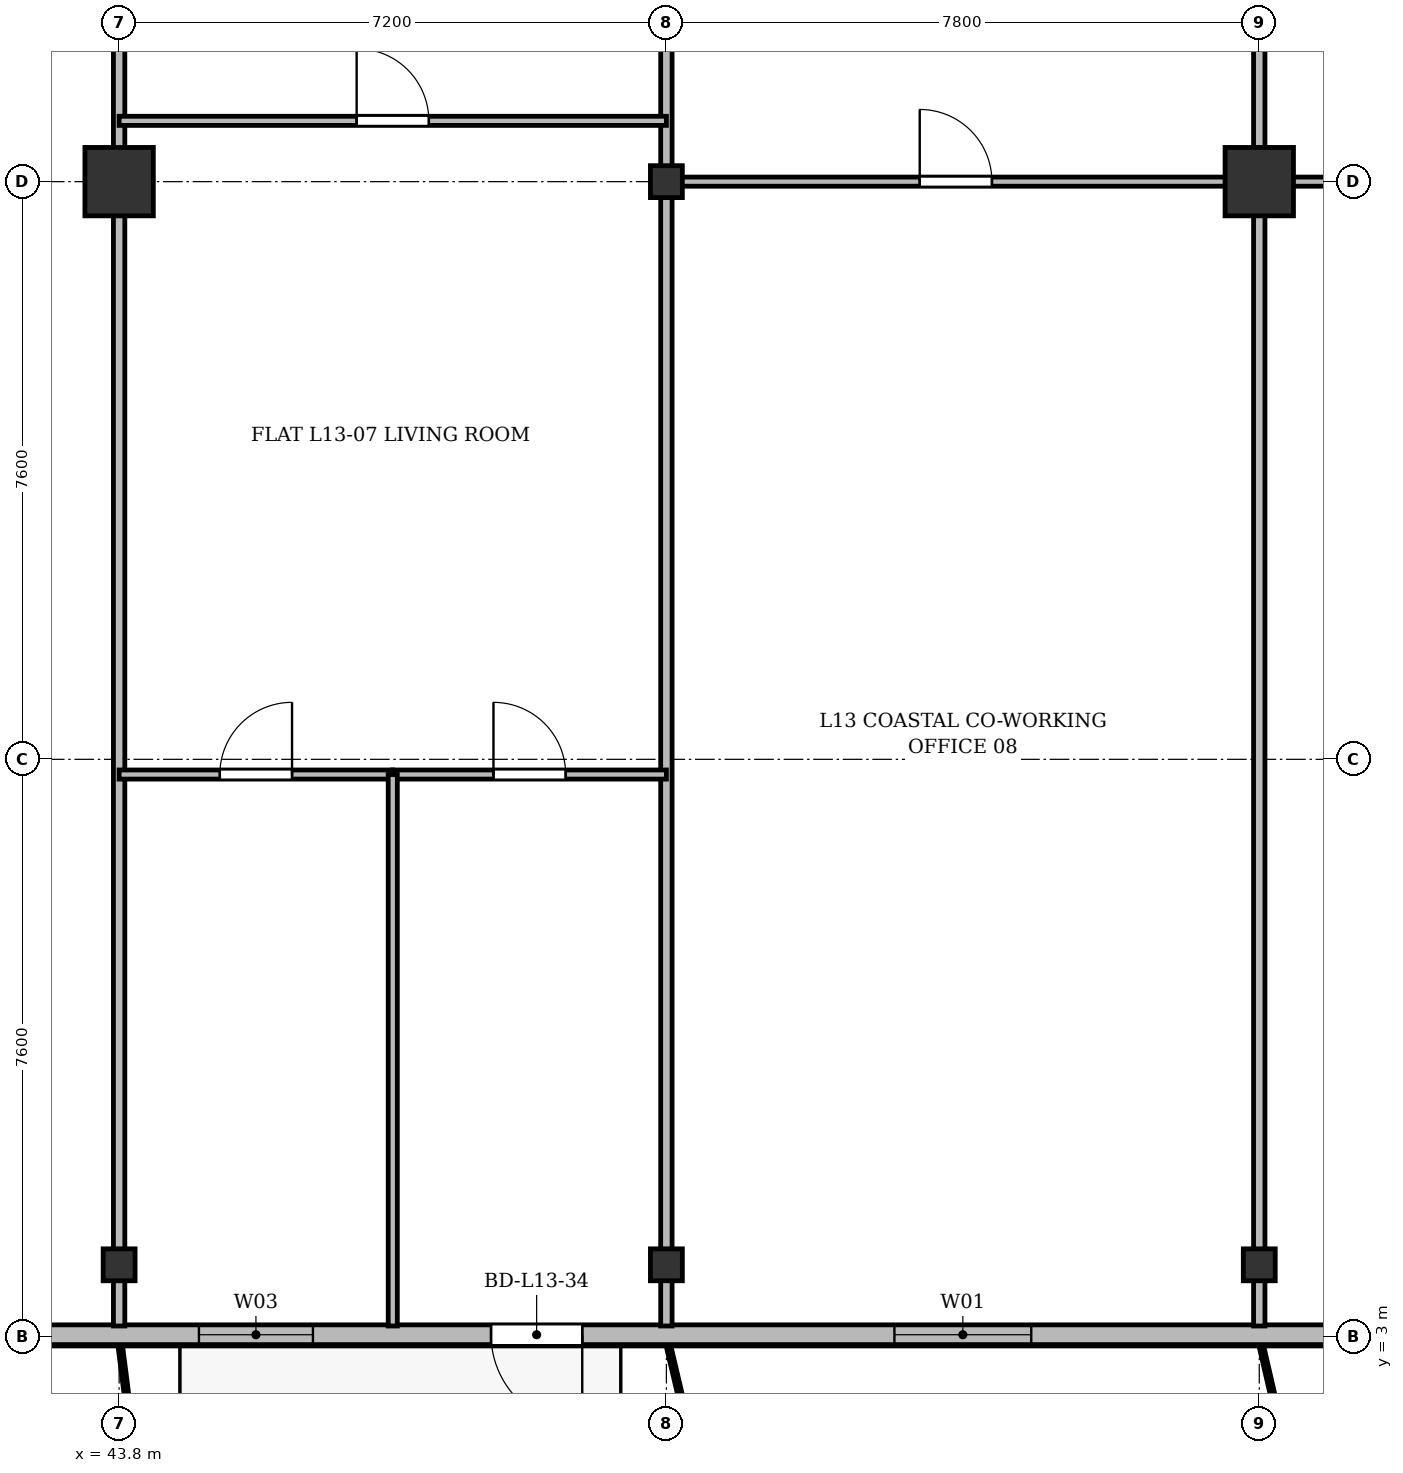
"""IFC4 building model, lengths in metres.
Left out: names, types, materials, properties, quantities, classifications, styles, units other than length and angle.
Written with IfcOpenShell. Run it as: python <this file> out.ifc"""

import sys

from ifc_helpers import new_model, si_unit, direction, frame, frame_2d, origin, origin_2d, place, context, subcontext, project, spatial, rectangle, i_section, extrude, source, transform, mapped, element, fill, save


model = new_model("IFC4")
c1 = context("Model", 3, precision=1e-05, world=origin(), true_north=direction((0.0, 1.0)))
c2 = subcontext(c1, "Body", "Model", "MODEL_VIEW")
j1 = project(units=[si_unit("LENGTHUNIT", "METRE"), si_unit("PLANEANGLEUNIT", "RADIAN")], contexts=[c1])
p1 = place(None, origin())
s1 = spatial("IfcSite", under=j1, at=p1, CompositionType="ELEMENT")
p2 = place(p1, origin())
s2 = spatial("IfcBuilding", under=s1, at=p2, CompositionType="ELEMENT")
p3 = place(p2, frame((0.0, 0.0, 52.3)))
s3 = spatial("IfcBuildingStorey", under=s2, at=p3, CompositionType="ELEMENT", Elevation=52.3)
m1 = source(origin(), c2, "Body", "SweptSolid", [
    extrude(i_section(OverallWidth=0.42, OverallDepth=0.42, WebThickness=0.026, FlangeThickness=0.04, at=origin_2d()), origin(), (0.0, 0.0, 1.0), 3.6),
])
p4 = place(p3, frame((43.8, 3.95, 0.0), z_axis=(0.0, 0.0, 1.0), x_axis=(1.0, 0.0, 0.0)))
e1 = element("IfcColumn", 1, at=p4, inside=s3, PredefinedType="COLUMN", context=c2, shape_type="MappedRepresentation", body=[
    mapped(m1, transform((0.0, 0.0, 0.0), x_axis=(1.0, 0.0, 0.0), y_axis=(0.0, 1.0, 0.0), z_axis=(0.0, 0.0, 1.0), scale=1.0)),
])
m2 = source(origin(), c2, "Body", "SweptSolid", [
    extrude(rectangle(XDim=0.9, YDim=0.9, at=origin_2d()), origin(), (0.0, 0.0, 1.0), 3.6),
])
p5 = place(p3, frame((43.8, 18.2, 0.0), z_axis=(0.0, 0.0, 1.0), x_axis=(1.0, 0.0, 0.0)))
e2 = element("IfcColumn", 2, at=p5, inside=s3, PredefinedType="COLUMN", context=c2, shape_type="MappedRepresentation", body=[
    mapped(m2, transform((0.0, 0.0, 0.0), x_axis=(1.0, 0.0, 0.0), y_axis=(0.0, 1.0, 0.0), z_axis=(0.0, 0.0, 1.0), scale=1.0)),
])
for number, where, z_axis, x_axis in (
    (3, (51.0, 3.95, 0.0), (0.0, 0.0, 1.0), (1.0, 0.0, 0.0)),
    (4, (51.0, 18.2, 0.0), (0.0, 0.0, 1.0), (1.0, 0.0, 0.0)),
    (5, (58.8, 3.95, 0.0), (0.0, 0.0, 1.0), (1.0, 0.0, 0.0)),
):
    element("IfcColumn", number, at=place(p3, frame(where, z_axis=z_axis, x_axis=x_axis)), inside=s3, PredefinedType="COLUMN", context=c2, shape_type="MappedRepresentation", body=[
        mapped(m1, transform((0.0, 0.0, 0.0), x_axis=(1.0, 0.0, 0.0), y_axis=(0.0, 1.0, 0.0), z_axis=(0.0, 0.0, 1.0), scale=1.0)),
    ])
p6 = place(p3, frame((58.8, 18.2, 0.0), z_axis=(0.0, 0.0, 1.0), x_axis=(1.0, 0.0, 0.0)))
e6 = element("IfcColumn", 6, at=p6, inside=s3, PredefinedType="COLUMN", context=c2, shape_type="MappedRepresentation", body=[
    mapped(m2, transform((0.0, 0.0, 0.0), x_axis=(1.0, 0.0, 0.0), y_axis=(0.0, 1.0, 0.0), z_axis=(0.0, 0.0, 1.0), scale=1.0)),
])
p7 = place(p3, frame((66.9, 3.03, 0.0), z_axis=(0.0, 0.0, 1.0), x_axis=(-1.0, 0.0, 0.0)))
e7 = element("IfcWall", 7, at=p7, inside=s3, PredefinedType="SOLIDWALL", context=c2, shape_type="SweptSolid", body=[
    extrude(rectangle(XDim=59.4, YDim=0.26, at=frame_2d((29.7, 0.0))), origin(), (0.0, 0.0, 1.0), 3.34),
])
p8 = place(p7, frame((0.495, 0.0, 0.9)))
e8 = element("IfcOpeningElement", 8, at=p8, cuts=e7, PredefinedType="OPENING", context=c2, shape_type="SweptSolid", body=[
    extrude(rectangle(XDim=2.0, YDim=1.95, at=frame_2d((1.0, 0.975))), frame((0.0, 0.14, 0.0), z_axis=(0.0, -1.0, 0.0), x_axis=(1.0, 0.0, 0.0)), (0.0, 0.0, 1.0), 0.28),
])
p9 = place(p7, frame((4.675, 0.0, 0.9)))
e9 = element("IfcOpeningElement", 9, at=p9, cuts=e7, PredefinedType="OPENING", context=c2, shape_type="SweptSolid", body=[
    extrude(rectangle(XDim=1.65, YDim=1.85, at=frame_2d((0.825, 0.925))), frame((0.0, 0.14, 0.0), z_axis=(0.0, -1.0, 0.0), x_axis=(1.0, 0.0, 0.0)), (0.0, 0.0, 1.0), 0.28),
])
p10 = place(p7, frame((11.1, 0.0, 0.9)))
e10 = element("IfcOpeningElement", 10, at=p10, cuts=e7, PredefinedType="OPENING", context=c2, shape_type="SweptSolid", body=[
    extrude(rectangle(XDim=1.8, YDim=1.8, at=frame_2d((0.9, 0.9))), frame((0.0, 0.14, 0.0), z_axis=(0.0, -1.0, 0.0), x_axis=(1.0, 0.0, 0.0)), (0.0, 0.0, 1.0), 0.28),
])
p11 = place(p7, frame((17.007, 0.0, 0.0)))
e11 = element("IfcOpeningElement", 11, at=p11, cuts=e7, PredefinedType="OPENING", context=c2, shape_type="SweptSolid", body=[
    extrude(rectangle(XDim=1.2, YDim=2.2, at=frame_2d((0.6, 1.1))), frame((0.0, 0.14, 0.0), z_axis=(0.0, -1.0, 0.0), x_axis=(1.0, 0.0, 0.0)), (0.0, 0.0, 1.0), 0.28),
])
p12 = place(p7, frame((20.55, 0.0, 0.9)))
e12 = element("IfcOpeningElement", 12, at=p12, cuts=e7, PredefinedType="OPENING", context=c2, shape_type="SweptSolid", body=[
    extrude(rectangle(XDim=1.5, YDim=1.75, at=frame_2d((0.75, 0.875))), frame((0.0, 0.14, 0.0), z_axis=(0.0, -1.0, 0.0), x_axis=(1.0, 0.0, 0.0)), (0.0, 0.0, 1.0), 0.28),
])
p13 = place(p7, frame((24.5, 0.0, 0.9)))
e13 = element("IfcOpeningElement", 13, at=p13, cuts=e7, PredefinedType="OPENING", context=c2, shape_type="SweptSolid", body=[
    extrude(rectangle(XDim=2.0, YDim=1.95, at=frame_2d((1.0, 0.975))), frame((0.0, 0.14, 0.0), z_axis=(0.0, -1.0, 0.0), x_axis=(1.0, 0.0, 0.0)), (0.0, 0.0, 1.0), 0.28),
])
p14 = place(p7, frame((31.275, 0.0, 0.9)))
e14 = element("IfcOpeningElement", 14, at=p14, cuts=e7, PredefinedType="OPENING", context=c2, shape_type="SweptSolid", body=[
    extrude(rectangle(XDim=1.65, YDim=1.85, at=frame_2d((0.825, 0.925))), frame((0.0, 0.14, 0.0), z_axis=(0.0, -1.0, 0.0), x_axis=(1.0, 0.0, 0.0)), (0.0, 0.0, 1.0), 0.28),
])
p15 = place(p7, frame((39.0, 0.0, 0.9)))
e15 = element("IfcOpeningElement", 15, at=p15, cuts=e7, PredefinedType="OPENING", context=c2, shape_type="SweptSolid", body=[
    extrude(rectangle(XDim=1.8, YDim=1.8, at=frame_2d((0.9, 0.9))), frame((0.0, 0.14, 0.0), z_axis=(0.0, -1.0, 0.0), x_axis=(1.0, 0.0, 0.0)), (0.0, 0.0, 1.0), 0.28),
])
p16 = place(p7, frame((45.435, 0.0, 0.0)))
e16 = element("IfcOpeningElement", 16, at=p16, cuts=e7, PredefinedType="OPENING", context=c2, shape_type="SweptSolid", body=[
    extrude(rectangle(XDim=1.2, YDim=2.2, at=frame_2d((0.6, 1.1))), frame((0.0, 0.14, 0.0), z_axis=(0.0, -1.0, 0.0), x_axis=(1.0, 0.0, 0.0)), (0.0, 0.0, 1.0), 0.28),
])
p17 = place(p7, frame((48.6, 0.0, 0.9)))
e17 = element("IfcOpeningElement", 17, at=p17, cuts=e7, PredefinedType="OPENING", context=c2, shape_type="SweptSolid", body=[
    extrude(rectangle(XDim=1.5, YDim=1.75, at=frame_2d((0.75, 0.875))), frame((0.0, 0.14, 0.0), z_axis=(0.0, -1.0, 0.0), x_axis=(1.0, 0.0, 0.0)), (0.0, 0.0, 1.0), 0.28),
])
p18 = place(p7, frame((52.1, 0.0, 0.9)))
e18 = element("IfcOpeningElement", 18, at=p18, cuts=e7, PredefinedType="OPENING", context=c2, shape_type="SweptSolid", body=[
    extrude(rectangle(XDim=2.0, YDim=1.95, at=frame_2d((1.0, 0.975))), frame((0.0, 0.14, 0.0), z_axis=(0.0, -1.0, 0.0), x_axis=(1.0, 0.0, 0.0)), (0.0, 0.0, 1.0), 0.28),
])
p19 = place(p7, frame((56.28, 0.0, 0.9)))
e19 = element("IfcOpeningElement", 19, at=p19, cuts=e7, PredefinedType="OPENING", context=c2, shape_type="SweptSolid", body=[
    extrude(rectangle(XDim=1.65, YDim=1.85, at=frame_2d((0.825, 0.925))), frame((0.0, 0.14, 0.0), z_axis=(0.0, -1.0, 0.0), x_axis=(1.0, 0.0, 0.0)), (0.0, 0.0, 1.0), 0.28),
])
for number, where, z_axis, x_axis in (
    (20, (43.8, 3.145, 0.0), (0.0, 0.0, 1.0), (0.0, 1.0, 0.0)),
    (21, (51.0, 3.145, 0.0), (0.0, 0.0, 1.0), (0.0, 1.0, 0.0)),
    (22, (58.8, 3.145, 0.0), (0.0, 0.0, 1.0), (0.0, 1.0, 0.0)),
):
    element("IfcWall", number, at=place(p3, frame(where, z_axis=z_axis, x_axis=x_axis)), inside=s3, PredefinedType="PARTITIONING", context=c2, shape_type="SweptSolid", body=[
        extrude(rectangle(XDim=24.455, YDim=0.15, at=frame_2d((12.228, 0.0))), origin(), (0.0, 0.0, 1.0), 2.752),
    ])
p20 = place(p3, frame((43.8, 19.0, 0.0), z_axis=(0.0, 0.0, 1.0), x_axis=(1.0, 0.0, 0.0)))
e23 = element("IfcWall", 23, at=p20, inside=s3, PredefinedType="PARTITIONING", context=c2, shape_type="SweptSolid", body=[
    extrude(rectangle(XDim=7.2, YDim=0.12, at=frame_2d((3.6, 0.0))), origin(), (0.0, 0.0, 1.0), 2.752),
])
p21 = place(p20, frame((3.125, 0.0, 0.0)))
e24 = element("IfcOpeningElement", 24, at=p21, cuts=e23, PredefinedType="OPENING", context=c2, shape_type="SweptSolid", body=[
    extrude(rectangle(XDim=0.95, YDim=2.15, at=frame_2d((0.475, 1.075))), frame((0.0, 0.07, 0.0), z_axis=(0.0, -1.0, 0.0), x_axis=(1.0, 0.0, 0.0)), (0.0, 0.0, 1.0), 0.14),
])
p22 = place(p3, frame((43.8, 10.4, 0.0), z_axis=(0.0, 0.0, 1.0), x_axis=(1.0, 0.0, 0.0)))
e25 = element("IfcWall", 25, at=p22, inside=s3, PredefinedType="PARTITIONING", context=c2, shape_type="SweptSolid", body=[
    extrude(rectangle(XDim=3.6, YDim=0.12, at=frame_2d((1.8, 0.0))), origin(), (0.0, 0.0, 1.0), 2.752),
])
p23 = place(p22, frame((1.325, 0.0, 0.0)))
e26 = element("IfcOpeningElement", 26, at=p23, cuts=e25, PredefinedType="OPENING", context=c2, shape_type="SweptSolid", body=[
    extrude(rectangle(XDim=0.95, YDim=2.15, at=frame_2d((0.475, 1.075))), frame((0.0, 0.07, 0.0), z_axis=(0.0, -1.0, 0.0), x_axis=(1.0, 0.0, 0.0)), (0.0, 0.0, 1.0), 0.14),
])
p24 = place(p3, frame((47.4, 10.4, 0.0), z_axis=(0.0, 0.0, 1.0), x_axis=(1.0, 0.0, 0.0)))
e27 = element("IfcWall", 27, at=p24, inside=s3, PredefinedType="PARTITIONING", context=c2, shape_type="SweptSolid", body=[
    extrude(rectangle(XDim=3.6, YDim=0.12, at=frame_2d((1.8, 0.0))), origin(), (0.0, 0.0, 1.0), 2.752),
])
p25 = place(p24, frame((1.325, 0.0, 0.0)))
e28 = element("IfcOpeningElement", 28, at=p25, cuts=e27, PredefinedType="OPENING", context=c2, shape_type="SweptSolid", body=[
    extrude(rectangle(XDim=0.95, YDim=2.15, at=frame_2d((0.475, 1.075))), frame((0.0, 0.07, 0.0), z_axis=(0.0, -1.0, 0.0), x_axis=(1.0, 0.0, 0.0)), (0.0, 0.0, 1.0), 0.14),
])
p26 = place(p3, frame((47.4, 3.145, 0.0), z_axis=(0.0, 0.0, 1.0), x_axis=(0.0, 1.0, 0.0)))
e29 = element("IfcWall", 29, at=p26, inside=s3, PredefinedType="PARTITIONING", context=c2, shape_type="SweptSolid", body=[
    extrude(rectangle(XDim=7.255, YDim=0.12, at=frame_2d((3.627, 0.0))), origin(), (0.0, 0.0, 1.0), 2.69),
])
p27 = place(p3, frame((51.0, 18.2, 0.0), z_axis=(0.0, 0.0, 1.0), x_axis=(1.0, 0.0, 0.0)))
e30 = element("IfcWall", 30, at=p27, inside=s3, PredefinedType="PARTITIONING", context=c2, shape_type="SweptSolid", body=[
    extrude(rectangle(XDim=7.8, YDim=0.12, at=frame_2d((3.9, 0.0))), origin(), (0.0, 0.0, 1.0), 2.69),
])
p28 = place(p27, frame((3.333, 0.0, 0.0)))
e31 = element("IfcOpeningElement", 31, at=p28, cuts=e30, PredefinedType="OPENING", context=c2, shape_type="SweptSolid", body=[
    extrude(rectangle(XDim=0.95, YDim=2.15, at=frame_2d((0.475, 1.075))), frame((0.0, 0.07, 0.0), z_axis=(0.0, -1.0, 0.0), x_axis=(1.0, 0.0, 0.0)), (0.0, 0.0, 1.0), 0.14),
])
p29 = place(p3, frame((58.8, 18.2, 0.0), z_axis=(0.0, 0.0, 1.0), x_axis=(1.0, 0.0, 0.0)))
e32 = element("IfcWall", 32, at=p29, inside=s3, PredefinedType="PARTITIONING", context=c2, shape_type="SweptSolid", body=[
    extrude(rectangle(XDim=5.2, YDim=0.12, at=frame_2d((2.6, 0.0))), origin(), (0.0, 0.0, 1.0), 2.69),
])
p30 = place(p29, frame((2.033, 0.0, 0.0)))
e33 = element("IfcOpeningElement", 33, at=p30, cuts=e32, PredefinedType="OPENING", context=c2, shape_type="SweptSolid", body=[
    extrude(rectangle(XDim=0.95, YDim=2.15, at=frame_2d((0.475, 1.075))), frame((0.0, 0.07, 0.0), z_axis=(0.0, -1.0, 0.0), x_axis=(1.0, 0.0, 0.0)), (0.0, 0.0, 1.0), 0.14),
])
m3 = source(origin(), c2, "Body", "SweptSolid", [
    extrude(rectangle(XDim=1.8, YDim=1.8, at=frame_2d((0.9, 0.9))), frame((0.0, 0.03, 0.0), z_axis=(0.0, -1.0, 0.0), x_axis=(1.0, 0.0, 0.0)), (0.0, 0.0, 1.0), 0.06),
])
p31 = place(p10, origin())
e34 = element("IfcWindow", 34, at=p31, inside=s3, PartitioningType="SINGLE_PANEL", PredefinedType="WINDOW", context=c2, shape_type="MappedRepresentation", body=[
    mapped(m3, transform((0.0, 0.0, 0.0), x_axis=(1.0, 0.0, 0.0), y_axis=(0.0, 1.0, 0.0), z_axis=(0.0, 0.0, 1.0), scale=1.0)),
])
fill(e10, e34)
m4 = source(origin(), c2, "Body", "SweptSolid", [
    extrude(rectangle(XDim=1.2, YDim=2.2, at=frame_2d((0.6, 1.1))), frame((0.0, 0.025, 0.0), z_axis=(0.0, -1.0, 0.0), x_axis=(1.0, 0.0, 0.0)), (0.0, 0.0, 1.0), 0.05),
])
p32 = place(p11, origin())
e35 = element("IfcDoor", 35, at=p32, inside=s3, OperationType="SINGLE_SWING_LEFT", PredefinedType="DOOR", context=c2, shape_type="MappedRepresentation", body=[
    mapped(m4, transform((0.0, 0.0, 0.0), x_axis=(1.0, 0.0, 0.0), y_axis=(0.0, 1.0, 0.0), z_axis=(0.0, 0.0, 1.0), scale=1.0)),
])
fill(e11, e35)
m5 = source(origin(), c2, "Body", "SweptSolid", [
    extrude(rectangle(XDim=1.5, YDim=1.75, at=frame_2d((0.75, 0.875))), frame((0.0, 0.03, 0.0), z_axis=(0.0, -1.0, 0.0), x_axis=(1.0, 0.0, 0.0)), (0.0, 0.0, 1.0), 0.06),
])
p33 = place(p12, origin())
e36 = element("IfcWindow", 36, at=p33, inside=s3, PartitioningType="SINGLE_PANEL", PredefinedType="WINDOW", context=c2, shape_type="MappedRepresentation", body=[
    mapped(m5, transform((0.0, 0.0, 0.0), x_axis=(1.0, 0.0, 0.0), y_axis=(0.0, 1.0, 0.0), z_axis=(0.0, 0.0, 1.0), scale=1.0)),
])
fill(e12, e36)
m6 = source(origin(), c2, "Body", "SweptSolid", [
    extrude(rectangle(XDim=0.95, YDim=2.15, at=frame_2d((0.475, 1.075))), frame((0.0, 0.025, 0.0), z_axis=(0.0, -1.0, 0.0), x_axis=(1.0, 0.0, 0.0)), (0.0, 0.0, 1.0), 0.05),
])
p34 = place(p21, origin())
e37 = element("IfcDoor", 37, at=p34, inside=s3, OperationType="SINGLE_SWING_LEFT", PredefinedType="DOOR", context=c2, shape_type="MappedRepresentation", body=[
    mapped(m6, transform((0.0, 0.0, 0.0), x_axis=(1.0, 0.0, 0.0), y_axis=(0.0, 1.0, 0.0), z_axis=(0.0, 0.0, 1.0), scale=1.0)),
])
fill(e24, e37)
p35 = place(p23, origin())
e38 = element("IfcDoor", 38, at=p35, inside=s3, OperationType="SINGLE_SWING_RIGHT", PredefinedType="DOOR", context=c2, shape_type="MappedRepresentation", body=[
    mapped(m6, transform((0.0, 0.0, 0.0), x_axis=(1.0, 0.0, 0.0), y_axis=(0.0, 1.0, 0.0), z_axis=(0.0, 0.0, 1.0), scale=1.0)),
])
fill(e26, e38)
p36 = place(p25, origin())
e39 = element("IfcDoor", 39, at=p36, inside=s3, OperationType="SINGLE_SWING_LEFT", PredefinedType="DOOR", context=c2, shape_type="MappedRepresentation", body=[
    mapped(m6, transform((0.0, 0.0, 0.0), x_axis=(1.0, 0.0, 0.0), y_axis=(0.0, 1.0, 0.0), z_axis=(0.0, 0.0, 1.0), scale=1.0)),
])
fill(e28, e39)
p37 = place(p28, origin())
e40 = element("IfcDoor", 40, at=p37, inside=s3, OperationType="SINGLE_SWING_LEFT", PredefinedType="DOOR", context=c2, shape_type="MappedRepresentation", body=[
    mapped(m6, transform((0.0, 0.0, 0.0), x_axis=(1.0, 0.0, 0.0), y_axis=(0.0, 1.0, 0.0), z_axis=(0.0, 0.0, 1.0), scale=1.0)),
])
fill(e31, e40)
save(model, sys.argv[1])
